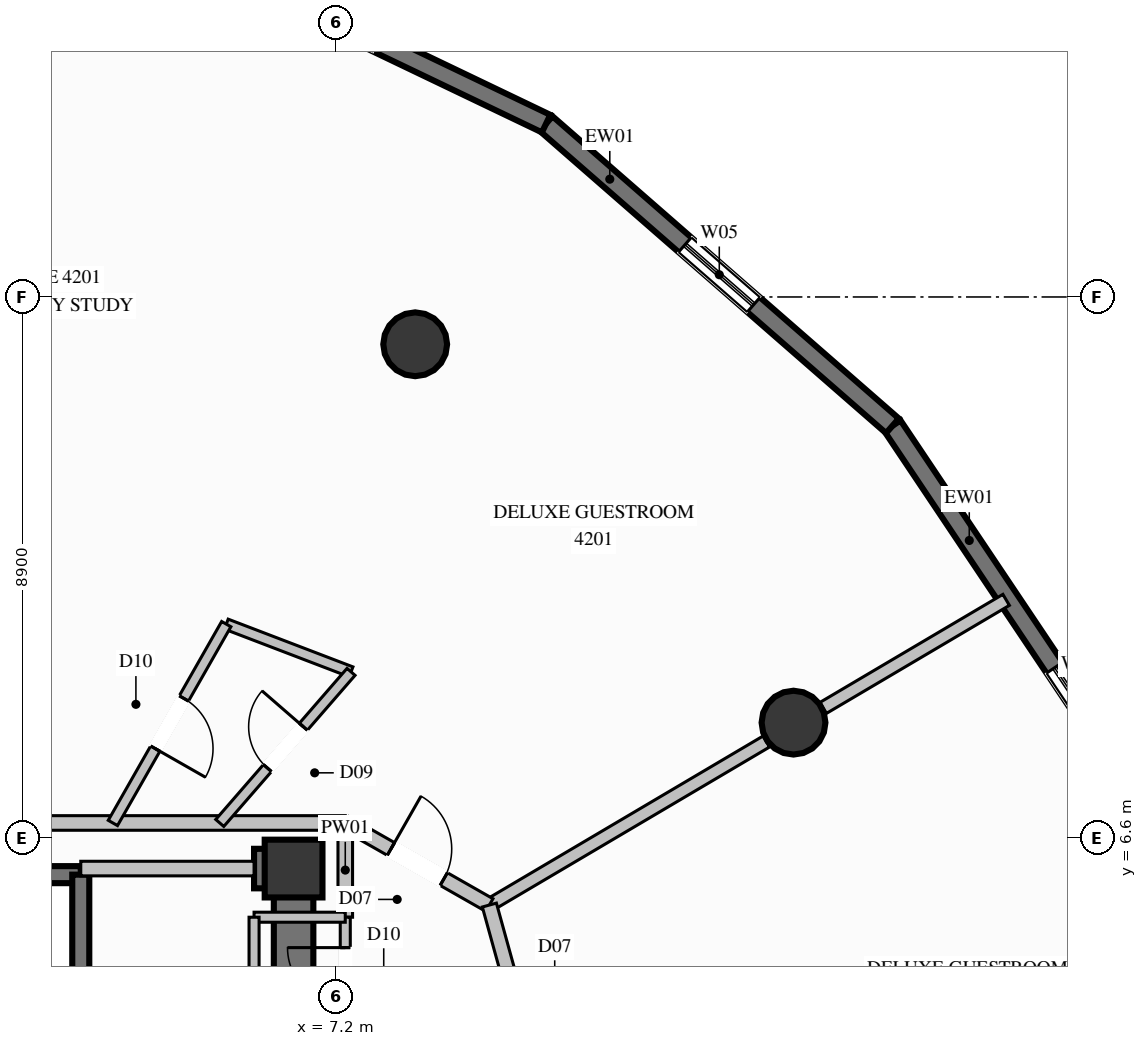
"""IFC4 building model, lengths in metres.
Left out: names, types, materials, properties, quantities, classifications, styles, units other than length and angle.
Written with IfcOpenShell. Run it as: python <this file> out.ifc"""

import sys

from ifc_helpers import new_model, si_unit, direction, frame, frame_2d, origin, origin_2d, place, context, subcontext, project, spatial, rectangle, circle, extrude, element, fill, save


model = new_model("IFC4")
c1 = context("Model", 3, precision=1e-05, world=origin(), true_north=direction((0.0, 1.0)))
c2 = subcontext(c1, "Body", "Model", "MODEL_VIEW")
j1 = project(units=[si_unit("LENGTHUNIT", "METRE"), si_unit("PLANEANGLEUNIT", "RADIAN")], contexts=[c1])
p1 = place(None, origin())
s1 = spatial("IfcSite", under=j1, at=p1, CompositionType="ELEMENT")
p2 = place(p1, origin())
s2 = spatial("IfcBuilding", under=s1, at=p2, CompositionType="ELEMENT")
p3 = place(p2, frame((0.0, 0.0, 156.6)))
s3 = spatial("IfcBuildingStorey", under=s2, at=p3, CompositionType="ELEMENT", Elevation=156.6)
p4 = place(p3, frame((6.5, 6.1, 0.0), z_axis=(0.0, 0.0, 1.0), x_axis=(1.0, 0.0, 0.0)))
e1 = element("IfcColumn", 1, at=p4, inside=s3, PredefinedType="COLUMN", context=c2, shape_type="SweptSolid", body=[
    extrude(rectangle(XDim=0.95, YDim=0.95, at=origin_2d()), origin(), (0.0, 0.0, 1.0), 3.6),
])
p5 = place(p3, frame((5.85, 6.1, 0.0), z_axis=(0.0, 0.0, 1.0), x_axis=(1.0, 0.0, 0.0)))
e2 = element("IfcWall", 2, at=p5, inside=s3, PredefinedType="SHEAR", context=c2, shape_type="SweptSolid", body=[
    extrude(rectangle(XDim=0.325, YDim=0.65, at=frame_2d((0.163, 0.0))), origin(), (0.0, 0.0, 1.0), 3.6),
])
p6 = place(p3, frame((6.5, 3.35, 0.0), z_axis=(0.0, 0.0, 1.0), x_axis=(0.0, 1.0, 0.0)))
e3 = element("IfcWall", 3, at=p6, inside=s3, PredefinedType="SHEAR", context=c2, shape_type="SweptSolid", body=[
    extrude(rectangle(XDim=3.075, YDim=0.65, at=frame_2d((1.538, 0.0))), origin(), (0.0, 0.0, 1.0), 3.6),
])
for number, where, z_axis, x_axis in (
    (4, (14.722, 8.5, 0.0), (0.0, 0.0, 1.0), (1.0, 0.0, 0.0)),
    (5, (8.5, 14.722, 0.0), (0.0, 0.0, 1.0), (1.0, 0.0, 0.0)),
):
    element("IfcColumn", number, at=place(p3, frame(where, z_axis=z_axis, x_axis=x_axis)), inside=s3, PredefinedType="COLUMN", context=c2, shape_type="SweptSolid", body=[
        extrude(circle(Radius=0.525, at=origin_2d()), origin(), (0.0, 0.0, 1.0), 3.6),
    ])
p7 = place(p3, frame((16.349, 13.381, 0.0), z_axis=(0.0, 0.0, 1.0), x_axis=(0.556688780243, -0.830721133685, 0.0)))
e6 = element("IfcWall", 6, at=p7, inside=s3, PredefinedType="SOLIDWALL", context=c2, shape_type="SweptSolid", body=[
    extrude(rectangle(XDim=7.559, YDim=0.32, at=frame_2d((3.779, 0.0))), origin(), (0.0, 0.0, 1.0), 3.35),
])
p8 = place(p7, frame((4.789, 0.0, 0.85)))
e7 = element("IfcOpeningElement", 7, at=p8, cuts=e6, PredefinedType="OPENING", context=c2, shape_type="SweptSolid", body=[
    extrude(rectangle(XDim=1.5, YDim=1.2, at=frame_2d((0.75, 0.6))), frame((0.0, 0.17, 0.0), z_axis=(0.0, -1.0, 0.0), x_axis=(1.0, 0.0, 0.0)), (0.0, 0.0, 1.0), 0.34),
])
p9 = place(p3, frame((10.653, 18.351, 0.0), z_axis=(0.0, 0.0, 1.0), x_axis=(0.753498250632, -0.657449911624, 0.0)))
e8 = element("IfcWall", 8, at=p9, inside=s3, PredefinedType="SOLIDWALL", context=c2, shape_type="SweptSolid", body=[
    extrude(rectangle(XDim=7.56, YDim=0.32, at=frame_2d((3.78, 0.0))), origin(), (0.0, 0.0, 1.0), 3.35),
])
p10 = place(p9, frame((3.03, 0.0, 0.85)))
e9 = element("IfcOpeningElement", 9, at=p10, cuts=e8, PredefinedType="OPENING", context=c2, shape_type="SweptSolid", body=[
    extrude(rectangle(XDim=1.5, YDim=1.2, at=frame_2d((0.75, 0.6))), frame((0.0, 0.17, 0.0), z_axis=(0.0, -1.0, 0.0), x_axis=(1.0, 0.0, 0.0)), (0.0, 0.0, 1.0), 0.34),
])
p11 = place(p3, frame((4.028, 21.524, 0.0), z_axis=(0.0, 0.0, 1.0), x_axis=(0.901902357259, -0.431939970332, 0.0)))
e10 = element("IfcWall", 10, at=p11, inside=s3, PredefinedType="SOLIDWALL", context=c2, shape_type="SweptSolid", body=[
    extrude(rectangle(XDim=7.346, YDim=0.32, at=frame_2d((3.673, 0.0))), origin(), (0.0, 0.0, 1.0), 3.35),
])
p12 = place(p11, frame((2.474, 0.0, 0.35)))
e11 = element("IfcOpeningElement", 11, at=p12, cuts=e10, PredefinedType="OPENING", context=c2, shape_type="SweptSolid", body=[
    extrude(rectangle(XDim=1.8, YDim=2.6, at=frame_2d((0.9, 1.3))), frame((0.0, 0.17, 0.0), z_axis=(0.0, -1.0, 0.0), x_axis=(1.0, 0.0, 0.0)), (0.0, 0.0, 1.0), 0.34),
])
p13 = place(p3, frame((3.0, 6.0, 0.0), z_axis=(0.0, 0.0, 1.0), x_axis=(-1.0, 0.0, 0.0)))
e12 = element("IfcWall", 12, at=p13, inside=s3, PredefinedType="SOLIDWALL", context=c2, shape_type="SweptSolid", body=[
    extrude(rectangle(XDim=2.2, YDim=0.28, at=frame_2d((1.1, 0.0))), origin(), (0.0, 0.0, 1.0), 3.35),
])
p14 = place(p3, frame((3.0, 3.5, 0.0), z_axis=(0.0, 0.0, 1.0), x_axis=(0.0, 1.0, 0.0)))
e13 = element("IfcWall", 13, at=p14, inside=s3, PredefinedType="SOLIDWALL", context=c2, shape_type="SweptSolid", body=[
    extrude(rectangle(XDim=2.5, YDim=0.28, at=frame_2d((1.25, 0.0))), origin(), (0.0, 0.0, 1.0), 3.35),
])
p15 = place(p3, frame((-7.35, 6.85, 0.0), z_axis=(0.0, 0.0, 1.0), x_axis=(1.0, 0.0, 0.0)))
e14 = element("IfcWall", 14, at=p15, inside=s3, PredefinedType="PARTITIONING", context=c2, shape_type="SweptSolid", body=[
    extrude(rectangle(XDim=14.7, YDim=0.24, at=frame_2d((7.35, 0.0))), origin(), (0.0, 0.0, 1.0), 2.435),
])
p16 = place(p3, frame((7.35, 5.3, 0.0), z_axis=(0.0, 0.0, 1.0), x_axis=(0.0, 1.0, 0.0)))
e15 = element("IfcWall", 15, at=p16, inside=s3, PredefinedType="PARTITIONING", context=c2, shape_type="SweptSolid", body=[
    extrude(rectangle(XDim=1.55, YDim=0.24, at=frame_2d((0.775, 0.0))), origin(), (0.0, 0.0, 1.0), 2.435),
])
p17 = place(p3, frame((3.0, 6.1, 0.0), z_axis=(0.0, 0.0, 1.0), x_axis=(1.0, 0.0, 0.0)))
e16 = element("IfcWall", 16, at=p17, inside=s3, PredefinedType="PARTITIONING", context=c2, shape_type="SweptSolid", body=[
    extrude(rectangle(XDim=2.85, YDim=0.24, at=frame_2d((1.425, 0.0))), origin(), (0.0, 0.0, 1.0), 2.435),
])
p18 = place(p3, frame((7.35, 3.35, 0.0), z_axis=(0.0, 0.0, 1.0), x_axis=(0.0, 1.0, 0.0)))
e17 = element("IfcWall", 17, at=p18, inside=s3, PredefinedType="PARTITIONING", context=c2, shape_type="SweptSolid", body=[
    extrude(rectangle(XDim=1.95, YDim=0.165, at=frame_2d((0.975, 0.0))), origin(), (0.0, 0.0, 1.0), 3.35),
])
p19 = place(p18, frame((0.5, 0.0, 0.0)))
e18 = element("IfcOpeningElement", 18, at=p19, cuts=e17, PredefinedType="OPENING", context=c2, shape_type="SweptSolid", body=[
    extrude(rectangle(XDim=0.95, YDim=2.1, at=frame_2d((0.475, 1.05))), frame((0.0, 0.093, 0.0), z_axis=(0.0, -1.0, 0.0), x_axis=(1.0, 0.0, 0.0)), (0.0, 0.0, 1.0), 0.185),
])
p20 = place(p3, frame((7.35, 5.3, 0.0), z_axis=(0.0, 0.0, 1.0), x_axis=(-1.0, 0.0, 0.0)))
e19 = element("IfcWall", 19, at=p20, inside=s3, PredefinedType="PARTITIONING", context=c2, shape_type="SweptSolid", body=[
    extrude(rectangle(XDim=1.5, YDim=0.165, at=frame_2d((0.75, 0.0))), origin(), (0.0, 0.0, 1.0), 2.435),
])
p21 = place(p3, frame((5.85, 5.3, 0.0), z_axis=(0.0, 0.0, 1.0), x_axis=(0.0, -1.0, 0.0)))
e20 = element("IfcWall", 20, at=p21, inside=s3, PredefinedType="PARTITIONING", context=c2, shape_type="SweptSolid", body=[
    extrude(rectangle(XDim=1.95, YDim=0.165, at=frame_2d((0.975, 0.0))), origin(), (0.0, 0.0, 1.0), 2.435),
])
p22 = place(p3, frame((9.72, 5.5, 0.0), z_axis=(0.0, 0.0, 1.0), x_axis=(0.861092827296, 0.508447777829, 0.0)))
e21 = element("IfcWall", 21, at=p22, inside=s3, PredefinedType="PARTITIONING", context=c2, shape_type="SweptSolid", body=[
    extrude(rectangle(XDim=5.289, YDim=0.21, at=frame_2d((2.644, 0.0))), origin(), (0.0, 0.0, 1.0), 2.717),
])
p23 = place(p3, frame((15.21, 8.742, 0.0), z_axis=(0.0, 0.0, 1.0), x_axis=(0.861047505043, 0.508524526508, 0.0)))
e22 = element("IfcWall", 22, at=p23, inside=s3, PredefinedType="PARTITIONING", context=c2, shape_type="SweptSolid", body=[
    extrude(rectangle(XDim=3.495, YDim=0.21, at=frame_2d((1.747, 0.0))), origin(), (0.0, 0.0, 1.0), 3.35),
])
p24 = place(p3, frame((5.393, 10.12, 0.0), z_axis=(0.0, 0.0, 1.0), x_axis=(0.933965679014, -0.357362715492, 0.0)))
e23 = element("IfcWall", 23, at=p24, inside=s3, PredefinedType="PLUMBINGWALL", context=c2, shape_type="SweptSolid", body=[
    extrude(rectangle(XDim=2.197, YDim=0.175, at=frame_2d((1.099, 0.0))), origin(), (0.0, 0.0, 1.0), 3.35),
])
p25 = place(p3, frame((5.393, 10.12, 0.0), z_axis=(0.0, 0.0, 1.0), x_axis=(-0.495419387998, -0.868653918425, 0.0)))
e24 = element("IfcWall", 24, at=p25, inside=s3, PredefinedType="PLUMBINGWALL", context=c2, shape_type="SweptSolid", body=[
    extrude(rectangle(XDim=3.764, YDim=0.175, at=frame_2d((1.882, 0.0))), origin(), (0.0, 0.0, 1.0), 3.35),
])
p26 = place(p25, frame((1.407, 0.0, 0.0)))
e25 = element("IfcOpeningElement", 25, at=p26, cuts=e24, PredefinedType="OPENING", context=c2, shape_type="SweptSolid", body=[
    extrude(rectangle(XDim=0.95, YDim=2.1, at=frame_2d((0.475, 1.05))), frame((0.0, 0.098, 0.0), z_axis=(0.0, -1.0, 0.0), x_axis=(1.0, 0.0, 0.0)), (0.0, 0.0, 1.0), 0.195),
])
p27 = place(p3, frame((5.286, 6.85, 0.0), z_axis=(0.0, 0.0, 1.0), x_axis=(0.655906923774, 0.754841776365, 0.0)))
e26 = element("IfcWall", 26, at=p27, inside=s3, PredefinedType="PLUMBINGWALL", context=c2, shape_type="SweptSolid", body=[
    extrude(rectangle(XDim=3.292, YDim=0.175, at=frame_2d((1.646, 0.0))), origin(), (0.0, 0.0, 1.0), 2.717),
])
p28 = place(p27, frame((1.196, 0.0, 0.0)))
e27 = element("IfcOpeningElement", 27, at=p28, cuts=e26, PredefinedType="OPENING", context=c2, shape_type="SweptSolid", body=[
    extrude(rectangle(XDim=0.9, YDim=2.1, at=frame_2d((0.45, 1.05))), frame((0.0, 0.098, 0.0), z_axis=(0.0, -1.0, 0.0), x_axis=(1.0, 0.0, 0.0)), (0.0, 0.0, 1.0), 0.195),
])
p29 = place(p3, frame((7.35, 6.85, 0.0), z_axis=(0.0, 0.0, 1.0), x_axis=(0.868892391395, -0.495001022398, 0.0)))
e28 = element("IfcWall", 28, at=p29, inside=s3, PredefinedType="PARTITIONING", context=c2, shape_type="SweptSolid", body=[
    extrude(rectangle(XDim=2.728, YDim=0.24, at=frame_2d((1.364, 0.0))), origin(), (0.0, 0.0, 1.0), 3.35),
])
p30 = place(p29, frame((0.864, 0.0, 0.0)))
e29 = element("IfcOpeningElement", 29, at=p30, cuts=e28, PredefinedType="OPENING", context=c2, shape_type="SweptSolid", body=[
    extrude(rectangle(XDim=1.0, YDim=2.2, at=frame_2d((0.5, 1.1))), frame((0.0, 0.13, 0.0), z_axis=(0.0, -1.0, 0.0), x_axis=(1.0, 0.0, 0.0)), (0.0, 0.0, 1.0), 0.26),
])
p31 = place(p3, frame((10.578, 2.397, 0.0), z_axis=(0.0, 0.0, 1.0), x_axis=(-0.266478138733, 0.963840962803, 0.0)))
e30 = element("IfcWall", 30, at=p31, inside=s3, PredefinedType="PARTITIONING", context=c2, shape_type="SweptSolid", body=[
    extrude(rectangle(XDim=3.219, YDim=0.24, at=frame_2d((1.61, 0.0))), origin(), (0.0, 0.0, 1.0), 3.35),
])
p32 = place(p31, frame((1.11, 0.0, 0.0)))
e31 = element("IfcOpeningElement", 31, at=p32, cuts=e30, PredefinedType="OPENING", context=c2, shape_type="SweptSolid", body=[
    extrude(rectangle(XDim=1.0, YDim=2.2, at=frame_2d((0.5, 1.1))), frame((0.0, 0.13, 0.0), z_axis=(0.0, -1.0, 0.0), x_axis=(1.0, 0.0, 0.0)), (0.0, 0.0, 1.0), 0.26),
])
p33 = place(p8, origin())
e32 = element("IfcWindow", 32, at=p33, inside=s3, PartitioningType="SINGLE_PANEL", PredefinedType="WINDOW", context=c2, shape_type="SweptSolid", body=[
    extrude(rectangle(XDim=1.5, YDim=1.2, at=frame_2d((0.75, 0.6))), frame((0.0, 0.03, 0.0), z_axis=(0.0, -1.0, 0.0), x_axis=(1.0, 0.0, 0.0)), (0.0, 0.0, 1.0), 0.06),
])
fill(e7, e32)
p34 = place(p10, origin())
e33 = element("IfcWindow", 33, at=p34, inside=s3, PartitioningType="SINGLE_PANEL", PredefinedType="WINDOW", context=c2, shape_type="SweptSolid", body=[
    extrude(rectangle(XDim=1.5, YDim=1.2, at=frame_2d((0.75, 0.6))), frame((0.0, 0.03, 0.0), z_axis=(0.0, -1.0, 0.0), x_axis=(1.0, 0.0, 0.0)), (0.0, 0.0, 1.0), 0.06),
])
fill(e9, e33)
p35 = place(p19, origin())
e34 = element("IfcDoor", 34, at=p35, inside=s3, OperationType="SINGLE_SWING_RIGHT", PredefinedType="DOOR", context=c2, shape_type="SweptSolid", body=[
    extrude(rectangle(XDim=0.95, YDim=2.1, at=frame_2d((0.475, 1.05))), frame((0.0, 0.025, 0.0), z_axis=(0.0, -1.0, 0.0), x_axis=(1.0, 0.0, 0.0)), (0.0, 0.0, 1.0), 0.05),
])
fill(e18, e34)
p36 = place(p28, origin())
e35 = element("IfcDoor", 35, at=p36, inside=s3, OperationType="SINGLE_SWING_RIGHT", PredefinedType="DOOR", context=c2, shape_type="SweptSolid", body=[
    extrude(rectangle(XDim=0.9, YDim=2.1, at=frame_2d((0.45, 1.05))), frame((0.0, 0.025, 0.0), z_axis=(0.0, -1.0, 0.0), x_axis=(1.0, 0.0, 0.0)), (0.0, 0.0, 1.0), 0.05),
])
fill(e27, e35)
p37 = place(p30, origin())
e36 = element("IfcDoor", 36, at=p37, inside=s3, OperationType="SINGLE_SWING_LEFT", PredefinedType="DOOR", context=c2, shape_type="SweptSolid", body=[
    extrude(rectangle(XDim=1.0, YDim=2.2, at=frame_2d((0.5, 1.1))), frame((0.0, 0.025, 0.0), z_axis=(0.0, -1.0, 0.0), x_axis=(1.0, 0.0, 0.0)), (0.0, 0.0, 1.0), 0.05),
])
fill(e29, e36)
p38 = place(p26, origin())
e37 = element("IfcDoor", 37, at=p38, inside=s3, OperationType="SINGLE_SWING_RIGHT", PredefinedType="DOOR", context=c2, shape_type="SweptSolid", body=[
    extrude(rectangle(XDim=0.95, YDim=2.1, at=frame_2d((0.475, 1.05))), frame((0.0, 0.025, 0.0), z_axis=(0.0, -1.0, 0.0), x_axis=(1.0, 0.0, 0.0)), (0.0, 0.0, 1.0), 0.05),
])
fill(e25, e37)
save(model, sys.argv[1])
